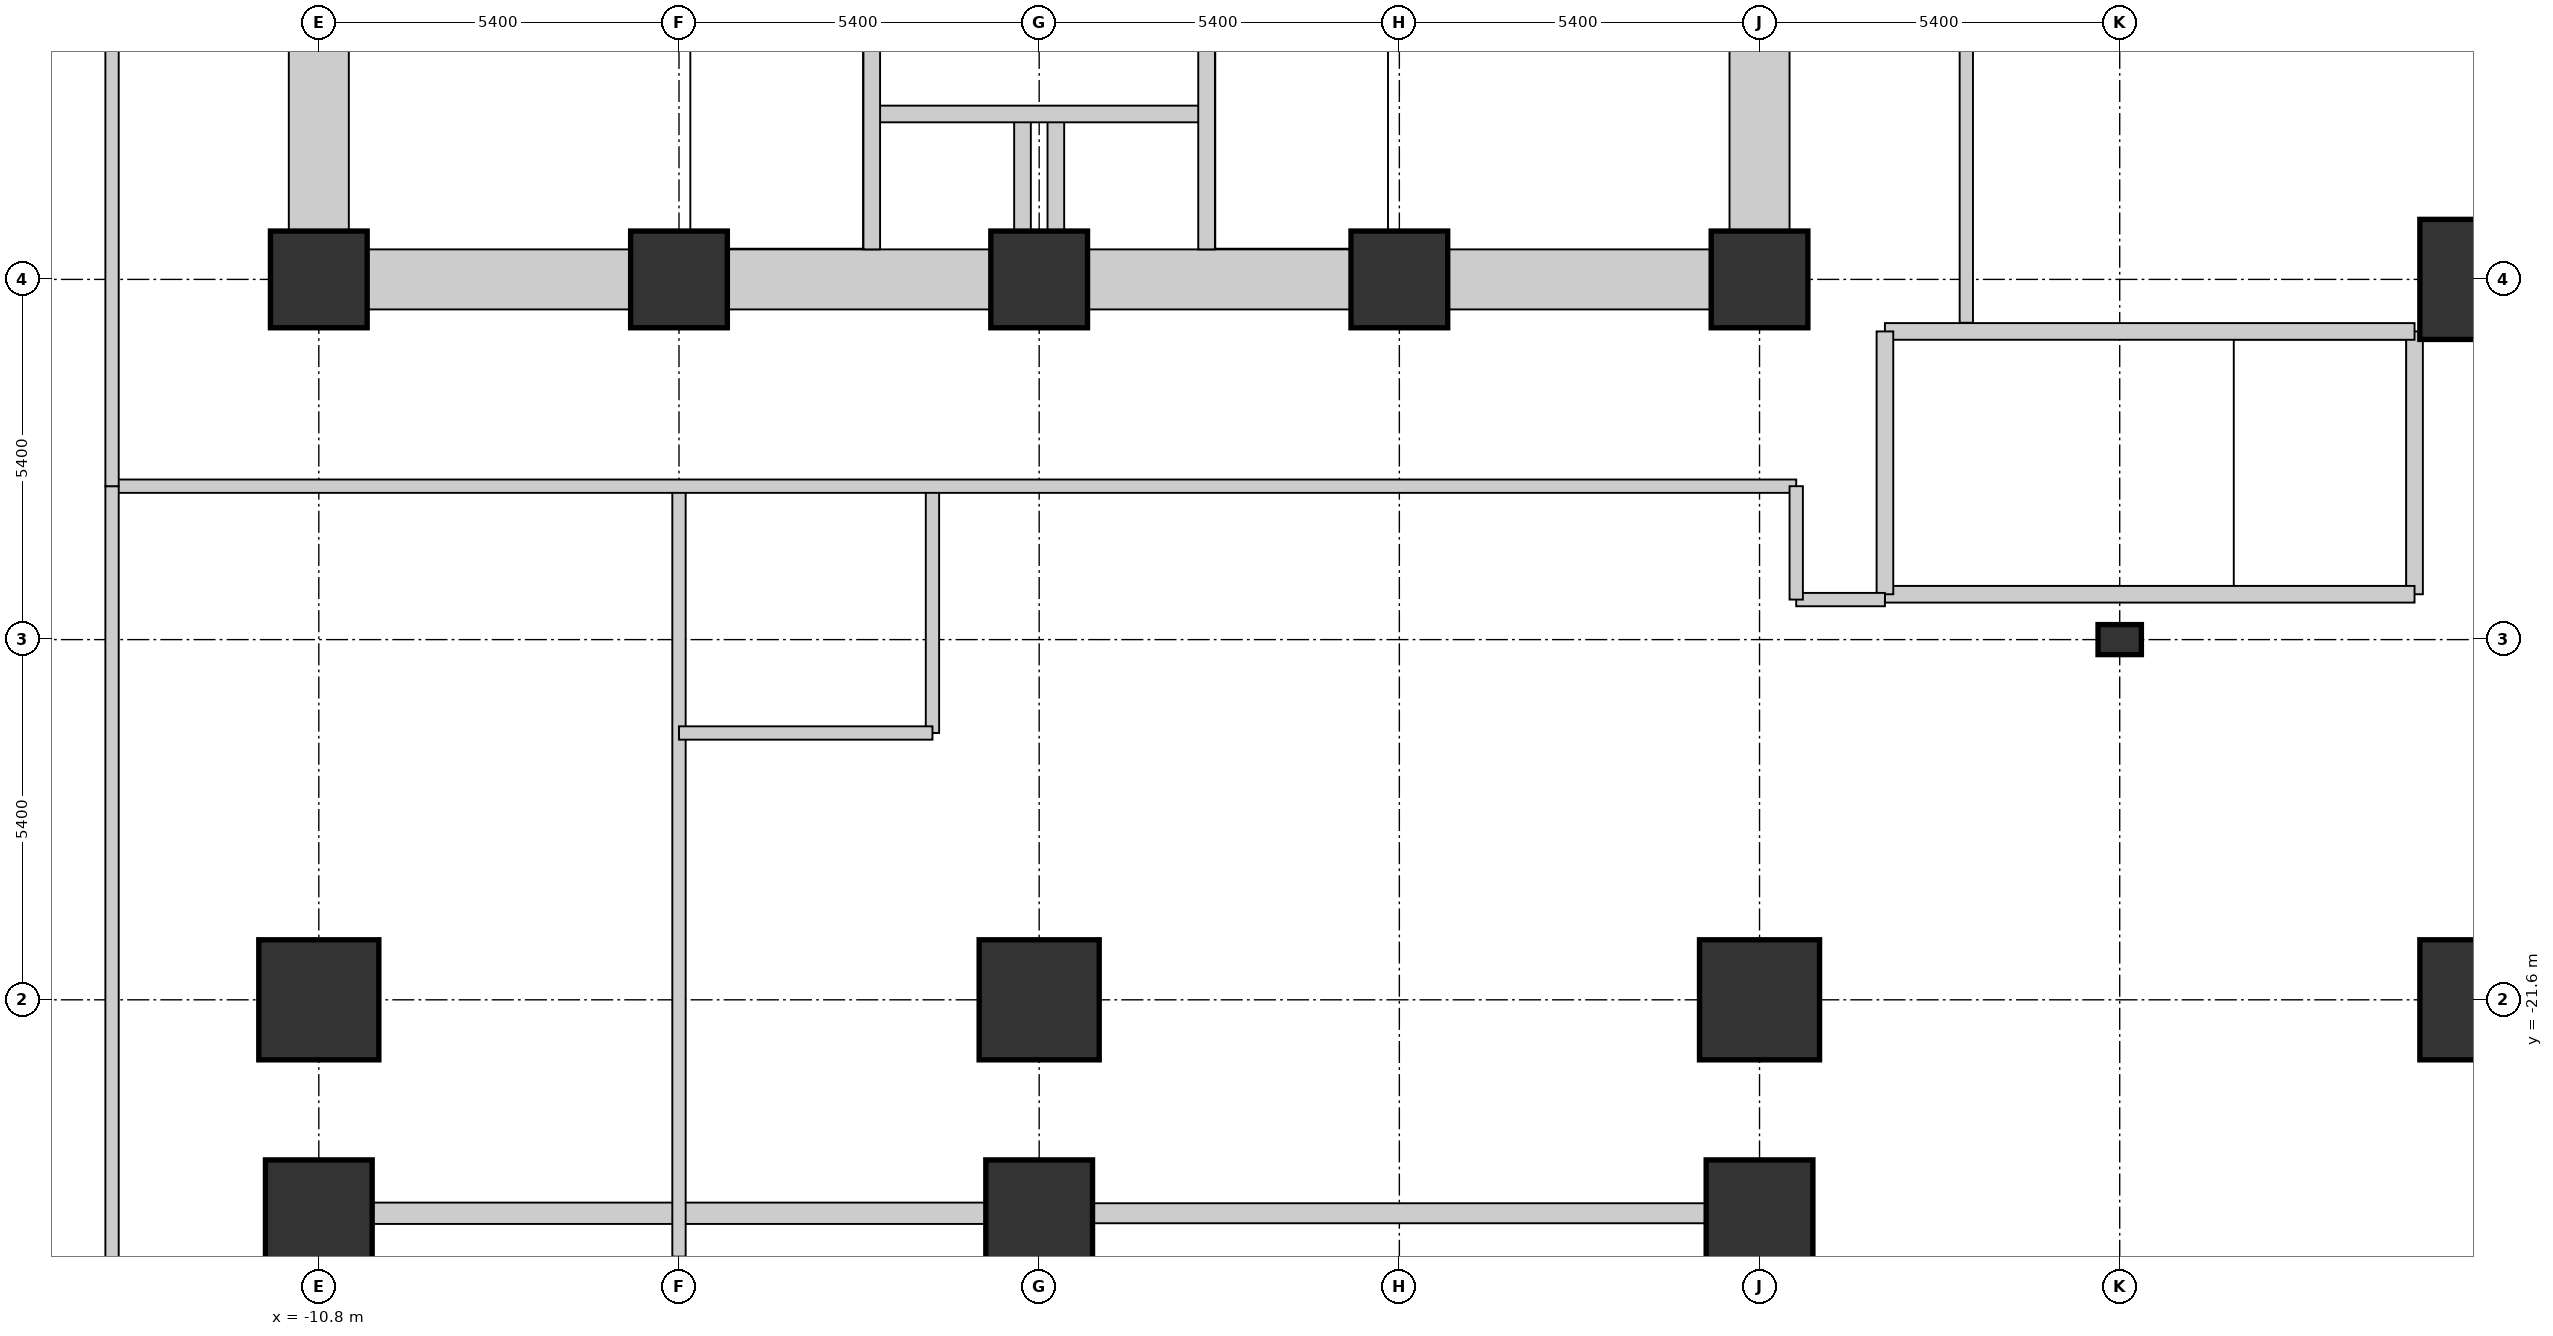
"""IFC4 building model, lengths in metres.
Left out: names, types, materials, properties, quantities, classifications, styles, units other than length and angle.
Written with IfcOpenShell. Run it as: python <this file> out.ifc"""

import sys

from ifc_helpers import new_model, si_unit, direction, frame, frame_2d, origin, origin_2d, place, context, subcontext, project, spatial, rectangle, circle, extrude, element, fill, save


model = new_model("IFC4")
c1 = context("Model", 3, precision=1e-05, world=origin(), true_north=direction((0.0, 1.0)))
c2 = subcontext(c1, "Body", "Model", "MODEL_VIEW")
j1 = project(units=[si_unit("LENGTHUNIT", "METRE"), si_unit("PLANEANGLEUNIT", "RADIAN")], contexts=[c1])
p1 = place(None, origin())
s1 = spatial("IfcSite", under=j1, at=p1, CompositionType="ELEMENT")
p2 = place(p1, origin())
s2 = spatial("IfcBuilding", under=s1, at=p2, CompositionType="ELEMENT")
p3 = place(p2, frame((0.0, 0.0, 9.0)))
s3 = spatial("IfcBuildingStorey", under=s2, at=p3, CompositionType="ELEMENT", Elevation=9.0)
p4 = place(p3, frame((-10.8, -24.8, 0.0), z_axis=(0.0, 0.0, 1.0), x_axis=(1.0, 0.0, 0.0)))
e1 = element("IfcColumn", 1, at=p4, inside=s3, PredefinedType="COLUMN", context=c2, shape_type="SweptSolid", body=[
    extrude(rectangle(XDim=1.6, YDim=1.6, at=origin_2d()), origin(), (0.0, 0.0, 1.0), 4.5),
])
p5 = place(p3, frame((-10.8, -21.6, 0.0), z_axis=(0.0, 0.0, 1.0), x_axis=(1.0, 0.0, 0.0)))
e2 = element("IfcColumn", 2, at=p5, inside=s3, PredefinedType="COLUMN", context=c2, shape_type="SweptSolid", body=[
    extrude(circle(Radius=0.9, at=origin_2d()), origin(), (0.0, 0.0, 1.0), 4.5),
])
for number, where, z_axis, x_axis in (
    (3, (-10.8, -10.8, 0.0), (0.0, 0.0, 1.0), (1.0, 0.0, 0.0)),
    (4, (-5.4, -10.8, 0.0), (0.0, 0.0, 1.0), (1.0, 0.0, 0.0)),
):
    element("IfcColumn", number, at=place(p3, frame(where, z_axis=z_axis, x_axis=x_axis)), inside=s3, PredefinedType="COLUMN", context=c2, shape_type="SweptSolid", body=[
        extrude(rectangle(XDim=1.45, YDim=1.45, at=origin_2d()), origin(), (0.0, 0.0, 1.0), 4.5),
    ])
p6 = place(p3, frame((0.0, -24.8, 0.0), z_axis=(0.0, 0.0, 1.0), x_axis=(1.0, 0.0, 0.0)))
e5 = element("IfcColumn", 5, at=p6, inside=s3, PredefinedType="COLUMN", context=c2, shape_type="SweptSolid", body=[
    extrude(rectangle(XDim=1.6, YDim=1.6, at=origin_2d()), origin(), (0.0, 0.0, 1.0), 4.5),
])
p7 = place(p3, frame((0.0, -21.6, 0.0), z_axis=(0.0, 0.0, 1.0), x_axis=(1.0, 0.0, 0.0)))
e6 = element("IfcColumn", 6, at=p7, inside=s3, PredefinedType="COLUMN", context=c2, shape_type="SweptSolid", body=[
    extrude(circle(Radius=0.9, at=origin_2d()), origin(), (0.0, 0.0, 1.0), 4.5),
])
for number, where, z_axis, x_axis in (
    (7, (0.0, -10.8, 0.0), (0.0, 0.0, 1.0), (1.0, 0.0, 0.0)),
    (8, (5.4, -10.8, 0.0), (0.0, 0.0, 1.0), (1.0, 0.0, 0.0)),
):
    element("IfcColumn", number, at=place(p3, frame(where, z_axis=z_axis, x_axis=x_axis)), inside=s3, PredefinedType="COLUMN", context=c2, shape_type="SweptSolid", body=[
        extrude(rectangle(XDim=1.45, YDim=1.45, at=origin_2d()), origin(), (0.0, 0.0, 1.0), 4.5),
    ])
p8 = place(p3, frame((10.8, -24.8, 0.0), z_axis=(0.0, 0.0, 1.0), x_axis=(1.0, 0.0, 0.0)))
e9 = element("IfcColumn", 9, at=p8, inside=s3, PredefinedType="COLUMN", context=c2, shape_type="SweptSolid", body=[
    extrude(rectangle(XDim=1.6, YDim=1.6, at=origin_2d()), origin(), (0.0, 0.0, 1.0), 4.5),
])
p9 = place(p3, frame((10.8, -21.6, 0.0), z_axis=(0.0, 0.0, 1.0), x_axis=(1.0, 0.0, 0.0)))
e10 = element("IfcColumn", 10, at=p9, inside=s3, PredefinedType="COLUMN", context=c2, shape_type="SweptSolid", body=[
    extrude(circle(Radius=0.9, at=origin_2d()), origin(), (0.0, 0.0, 1.0), 4.5),
])
p10 = place(p3, frame((10.8, -10.8, 0.0), z_axis=(0.0, 0.0, 1.0), x_axis=(1.0, 0.0, 0.0)))
e11 = element("IfcColumn", 11, at=p10, inside=s3, PredefinedType="COLUMN", context=c2, shape_type="SweptSolid", body=[
    extrude(rectangle(XDim=1.45, YDim=1.45, at=origin_2d()), origin(), (0.0, 0.0, 1.0), 4.5),
])
for number, where, z_axis, x_axis in (
    (12, (21.6, -21.6, 0.0), (0.0, 0.0, 1.0), (1.0, 0.0, 0.0)),
    (13, (21.6, -10.8, 0.0), (0.0, 0.0, 1.0), (1.0, 0.0, 0.0)),
):
    element("IfcColumn", number, at=place(p3, frame(where, z_axis=z_axis, x_axis=x_axis)), inside=s3, PredefinedType="COLUMN", context=c2, shape_type="SweptSolid", body=[
        extrude(circle(Radius=0.9, at=origin_2d()), origin(), (0.0, 0.0, 1.0), 4.5),
    ])
p11 = place(p3, frame((16.2, -16.2, 0.0), z_axis=(0.0, 0.0, 1.0), x_axis=(1.0, 0.0, 0.0)))
e14 = element("IfcColumn", 14, at=p11, inside=s3, PredefinedType="PILASTER", context=c2, shape_type="SweptSolid", body=[
    extrude(rectangle(XDim=0.65, YDim=0.45, at=origin_2d()), origin(), (0.0, 0.0, 1.0), 4.5),
])
for number, where, z_axis, x_axis in (
    (15, (-10.065, -10.8, 0.0), (0.0, 0.0, 1.0), (1.0, 0.0, 0.0)),
    (16, (-10.8, -10.065, 0.0), (0.0, 0.0, 1.0), (0.0, 1.0, 0.0)),
    (17, (10.8, -10.065, 0.0), (0.0, 0.0, 1.0), (0.0, 1.0, 0.0)),
    (18, (-4.665, -10.8, 0.0), (0.0, 0.0, 1.0), (1.0, 0.0, 0.0)),
    (19, (0.735, -10.8, 0.0), (0.0, 0.0, 1.0), (1.0, 0.0, 0.0)),
    (20, (6.135, -10.8, 0.0), (0.0, 0.0, 1.0), (1.0, 0.0, 0.0)),
):
    element("IfcWall", number, at=place(p3, frame(where, z_axis=z_axis, x_axis=x_axis)), inside=s3, PredefinedType="SHEAR", context=c2, shape_type="SweptSolid", body=[
        extrude(rectangle(XDim=3.93, YDim=0.9, at=frame_2d((1.965, 0.0))), origin(), (0.0, 0.0, 1.0), 4.5),
    ])
p12 = place(p3, frame((-0.798, -24.8, 0.0), z_axis=(0.0, 0.0, 1.0), x_axis=(-1.0, 0.0, 0.0)))
e21 = element("IfcWall", 21, at=p12, inside=s3, PredefinedType="STANDARD", context=c2, shape_type="SweptSolid", body=[
    extrude(rectangle(XDim=9.204, YDim=0.32, at=frame_2d((4.602, 0.0))), origin(), (0.0, 0.0, 1.0), 3.379),
])
p13 = place(p3, frame((10.002, -24.8, 0.0), z_axis=(0.0, 0.0, 1.0), x_axis=(-1.0, 0.0, 0.0)))
e22 = element("IfcWall", 22, at=p13, inside=s3, PredefinedType="STANDARD", context=c2, shape_type="SweptSolid", body=[
    extrude(rectangle(XDim=9.204, YDim=0.3, at=frame_2d((4.602, 0.0))), origin(), (0.0, 0.0, 1.0), 3.379),
])
p14 = place(p13, frame((3.702, 0.0, 0.85)))
e23 = element("IfcOpeningElement", 23, at=p14, cuts=e22, PredefinedType="OPENING", context=c2, shape_type="SweptSolid", body=[
    extrude(rectangle(XDim=1.8, YDim=1.75, at=frame_2d((0.9, 0.875))), frame((0.0, 0.16, 0.0), z_axis=(0.0, -1.0, 0.0), x_axis=(1.0, 0.0, 0.0)), (0.0, 0.0, 1.0), 0.32),
])
for number, where, z_axis, x_axis in (
    (24, (-0.25, -10.075, 0.0), (0.0, 0.0, 1.0), (0.0, 1.0, 0.0)),
    (25, (0.25, -10.075, 0.0), (0.0, 0.0, 1.0), (0.0, 1.0, 0.0)),
):
    element("IfcWall", number, at=place(p3, frame(where, z_axis=z_axis, x_axis=x_axis)), inside=s3, PredefinedType="SHEAR", context=c2, shape_type="SweptSolid", body=[
        extrude(rectangle(XDim=1.635, YDim=0.25, at=frame_2d((0.817, 0.0))), origin(), (0.0, 0.0, 1.0), 4.5),
    ])
p15 = place(p3, frame((-2.48, -8.32, 0.0), z_axis=(0.0, 0.0, 1.0), x_axis=(1.0, 0.0, 0.0)))
e26 = element("IfcWall", 26, at=p15, inside=s3, PredefinedType="SHEAR", context=c2, shape_type="SweptSolid", body=[
    extrude(rectangle(XDim=4.93, YDim=0.25, at=frame_2d((2.465, 0.0))), origin(), (0.0, 0.0, 1.0), 4.5),
])
for number, where, z_axis, x_axis in (
    (27, (2.51, -10.35, 0.0), (0.0, 0.0, 1.0), (0.0, 1.0, 0.0)),
    (28, (-2.51, -10.35, 0.0), (0.0, 0.0, 1.0), (0.0, 1.0, 0.0)),
):
    element("IfcWall", number, at=place(p3, frame(where, z_axis=z_axis, x_axis=x_axis)), inside=s3, PredefinedType="SHEAR", context=c2, shape_type="SweptSolid", body=[
        extrude(rectangle(XDim=3.84, YDim=0.25, at=frame_2d((1.92, 0.0))), origin(), (0.0, 0.0, 1.0), 4.5),
    ])
p16 = place(p3, frame((20.62, -15.52, 0.0), z_axis=(0.0, 0.0, 1.0), x_axis=(0.0, 1.0, 0.0)))
e29 = element("IfcWall", 29, at=p16, inside=s3, PredefinedType="SHEAR", context=c2, shape_type="SweptSolid", body=[
    extrude(rectangle(XDim=3.94, YDim=0.25, at=frame_2d((1.97, 0.0))), origin(), (0.0, 0.0, 1.0), 4.5),
])
for number, where, z_axis, x_axis in (
    (30, (12.68, -11.58, 0.0), (0.0, 0.0, 1.0), (1.0, 0.0, 0.0)),
    (31, (12.68, -15.52, 0.0), (0.0, 0.0, 1.0), (1.0, 0.0, 0.0)),
):
    element("IfcWall", number, at=place(p3, frame(where, z_axis=z_axis, x_axis=x_axis)), inside=s3, PredefinedType="SHEAR", context=c2, shape_type="SweptSolid", body=[
        extrude(rectangle(XDim=7.94, YDim=0.25, at=frame_2d((3.97, 0.0))), origin(), (0.0, 0.0, 1.0), 4.5),
    ])
p17 = place(p3, frame((12.68, -15.52, 0.0), z_axis=(0.0, 0.0, 1.0), x_axis=(0.0, 1.0, 0.0)))
e32 = element("IfcWall", 32, at=p17, inside=s3, PredefinedType="SHEAR", context=c2, shape_type="SweptSolid", body=[
    extrude(rectangle(XDim=3.94, YDim=0.25, at=frame_2d((1.97, 0.0))), origin(), (0.0, 0.0, 1.0), 4.5),
])
p18 = place(p17, frame((1.42, 0.0, 0.0)))
e33 = element("IfcOpeningElement", 33, at=p18, cuts=e32, PredefinedType="OPENING", context=c2, shape_type="SweptSolid", body=[
    extrude(rectangle(XDim=1.1, YDim=2.1, at=frame_2d((0.55, 1.05))), frame((0.0, 0.135, 0.0), z_axis=(0.0, -1.0, 0.0), x_axis=(1.0, 0.0, 0.0)), (0.0, 0.0, 1.0), 0.27),
])
p19 = place(p3, frame((-5.4, -25.45, 0.0), z_axis=(0.0, 0.0, 1.0), x_axis=(0.0, 1.0, 0.0)))
e34 = element("IfcWall", 34, at=p19, inside=s3, PredefinedType="PARTITIONING", context=c2, shape_type="SweptSolid", body=[
    extrude(rectangle(XDim=11.55, YDim=0.2, at=frame_2d((5.775, 0.0))), origin(), (0.0, 0.0, 1.0), 3.379),
])
p20 = place(p3, frame((-1.6, -17.6, 0.0), z_axis=(0.0, 0.0, 1.0), x_axis=(0.0, 1.0, 0.0)))
e35 = element("IfcWall", 35, at=p20, inside=s3, PredefinedType="PARTITIONING", context=c2, shape_type="SweptSolid", body=[
    extrude(rectangle(XDim=3.7, YDim=0.2, at=frame_2d((1.85, 0.0))), origin(), (0.0, 0.0, 1.0), 4.25),
])
p21 = place(p3, frame((-5.4, -17.6, 0.0), z_axis=(0.0, 0.0, 1.0), x_axis=(1.0, 0.0, 0.0)))
e36 = element("IfcWall", 36, at=p21, inside=s3, PredefinedType="PARTITIONING", context=c2, shape_type="SweptSolid", body=[
    extrude(rectangle(XDim=3.8, YDim=0.2, at=frame_2d((1.9, 0.0))), origin(), (0.0, 0.0, 1.0), 4.25),
])
p22 = place(p3, frame((13.9, -11.45, 0.0), z_axis=(0.0, 0.0, 1.0), x_axis=(0.0, 1.0, 0.0)))
e37 = element("IfcWall", 37, at=p22, inside=s3, PredefinedType="PARTITIONING", context=c2, shape_type="SweptSolid", body=[
    extrude(rectangle(XDim=25.35, YDim=0.2, at=frame_2d((12.675, 0.0))), origin(), (0.0, 0.0, 1.0), 3.379),
])
p23 = place(p22, frame((10.0, 0.0, 0.0)))
e38 = element("IfcOpeningElement", 38, at=p23, cuts=e37, PredefinedType="OPENING", context=c2, shape_type="SweptSolid", body=[
    extrude(rectangle(XDim=1.1, YDim=2.1, at=frame_2d((0.55, 1.05))), frame((0.0, 0.11, 0.0), z_axis=(0.0, -1.0, 0.0), x_axis=(1.0, 0.0, 0.0)), (0.0, 0.0, 1.0), 0.22),
])
p24 = place(p3, frame((-13.9, -13.9, 0.0), z_axis=(0.0, 0.0, 1.0), x_axis=(1.0, 0.0, 0.0)))
e39 = element("IfcWall", 39, at=p24, inside=s3, PredefinedType="PARTITIONING", context=c2, shape_type="SweptSolid", body=[
    extrude(rectangle(XDim=25.25, YDim=0.2, at=frame_2d((12.625, 0.0))), origin(), (0.0, 0.0, 1.0), 3.379),
])
p25 = place(p24, frame((3.5, 0.0, 0.0)))
e40 = element("IfcOpeningElement", 40, at=p25, cuts=e39, PredefinedType="OPENING", context=c2, shape_type="SweptSolid", body=[
    extrude(rectangle(XDim=1.1, YDim=2.1, at=frame_2d((0.55, 1.05))), frame((0.0, 0.11, 0.0), z_axis=(0.0, -1.0, 0.0), x_axis=(1.0, 0.0, 0.0)), (0.0, 0.0, 1.0), 0.22),
])
p26 = place(p24, frame((9.8, 0.0, 0.0)))
e41 = element("IfcOpeningElement", 41, at=p26, cuts=e39, PredefinedType="OPENING", context=c2, shape_type="SweptSolid", body=[
    extrude(rectangle(XDim=0.85, YDim=2.1, at=frame_2d((0.425, 1.05))), frame((0.0, 0.11, 0.0), z_axis=(0.0, -1.0, 0.0), x_axis=(1.0, 0.0, 0.0)), (0.0, 0.0, 1.0), 0.22),
])
p27 = place(p24, frame((16.5, 0.0, 0.0)))
e42 = element("IfcOpeningElement", 42, at=p27, cuts=e39, PredefinedType="OPENING", context=c2, shape_type="SweptSolid", body=[
    extrude(rectangle(XDim=1.1, YDim=2.1, at=frame_2d((0.55, 1.05))), frame((0.0, 0.11, 0.0), z_axis=(0.0, -1.0, 0.0), x_axis=(1.0, 0.0, 0.0)), (0.0, 0.0, 1.0), 0.22),
])
p28 = place(p3, frame((-13.9, -25.86, 0.0), z_axis=(0.0, 0.0, 1.0), x_axis=(0.0, 1.0, 0.0)))
e43 = element("IfcWall", 43, at=p28, inside=s3, PredefinedType="PARTITIONING", context=c2, shape_type="SweptSolid", body=[
    extrude(rectangle(XDim=11.96, YDim=0.2, at=frame_2d((5.98, 0.0))), origin(), (0.0, 0.0, 1.0), 3.379),
])
p29 = place(p3, frame((-13.9, -13.9, 0.0), z_axis=(0.0, 0.0, 1.0), x_axis=(0.0, 1.0, 0.0)))
e44 = element("IfcWall", 44, at=p29, inside=s3, PredefinedType="PARTITIONING", context=c2, shape_type="SweptSolid", body=[
    extrude(rectangle(XDim=27.8, YDim=0.2, at=frame_2d((13.9, 0.0))), origin(), (0.0, 0.0, 1.0), 3.379),
])
p30 = place(p29, frame((12.0, 0.0, 0.0)))
e45 = element("IfcOpeningElement", 45, at=p30, cuts=e44, PredefinedType="OPENING", context=c2, shape_type="SweptSolid", body=[
    extrude(rectangle(XDim=1.1, YDim=2.1, at=frame_2d((0.55, 1.05))), frame((0.0, 0.11, 0.0), z_axis=(0.0, -1.0, 0.0), x_axis=(1.0, 0.0, 0.0)), (0.0, 0.0, 1.0), 0.22),
])
p31 = place(p3, frame((11.35, -15.6, 0.0), z_axis=(0.0, 0.0, 1.0), x_axis=(1.0, 0.0, 0.0)))
e46 = element("IfcWall", 46, at=p31, inside=s3, PredefinedType="PARTITIONING", context=c2, shape_type="SweptSolid", body=[
    extrude(rectangle(XDim=1.33, YDim=0.2, at=frame_2d((0.665, 0.0))), origin(), (0.0, 0.0, 1.0), 4.25),
])
p32 = place(p3, frame((11.35, -15.6, 0.0), z_axis=(0.0, 0.0, 1.0), x_axis=(0.0, 1.0, 0.0)))
e47 = element("IfcWall", 47, at=p32, inside=s3, PredefinedType="PARTITIONING", context=c2, shape_type="SweptSolid", body=[
    extrude(rectangle(XDim=1.7, YDim=0.2, at=frame_2d((0.85, 0.0))), origin(), (0.0, 0.0, 1.0), 4.25),
])
p33 = place(p14, origin())
e48 = element("IfcWindow", 48, at=p33, inside=s3, PartitioningType="SINGLE_PANEL", PredefinedType="WINDOW", context=c2, shape_type="SweptSolid", body=[
    extrude(rectangle(XDim=1.8, YDim=1.75, at=frame_2d((0.9, 0.875))), frame((0.0, 0.03, 0.0), z_axis=(0.0, -1.0, 0.0), x_axis=(1.0, 0.0, 0.0)), (0.0, 0.0, 1.0), 0.06),
])
fill(e23, e48)
p34 = place(p18, origin())
e49 = element("IfcDoor", 49, at=p34, inside=s3, OperationType="SINGLE_SWING_LEFT", PredefinedType="DOOR", context=c2, shape_type="SweptSolid", body=[
    extrude(rectangle(XDim=1.1, YDim=2.1, at=frame_2d((0.55, 1.05))), frame((0.0, 0.025, 0.0), z_axis=(0.0, -1.0, 0.0), x_axis=(1.0, 0.0, 0.0)), (0.0, 0.0, 1.0), 0.05),
])
fill(e33, e49)
p35 = place(p25, origin())
e50 = element("IfcDoor", 50, at=p35, inside=s3, OperationType="SINGLE_SWING_RIGHT", PredefinedType="DOOR", context=c2, shape_type="SweptSolid", body=[
    extrude(rectangle(XDim=1.1, YDim=2.1, at=frame_2d((0.55, 1.05))), frame((0.0, 0.025, 0.0), z_axis=(0.0, -1.0, 0.0), x_axis=(1.0, 0.0, 0.0)), (0.0, 0.0, 1.0), 0.05),
])
fill(e40, e50)
p36 = place(p26, origin())
e51 = element("IfcDoor", 51, at=p36, inside=s3, OperationType="SINGLE_SWING_LEFT", PredefinedType="DOOR", context=c2, shape_type="SweptSolid", body=[
    extrude(rectangle(XDim=0.85, YDim=2.1, at=frame_2d((0.425, 1.05))), frame((0.0, 0.025, 0.0), z_axis=(0.0, -1.0, 0.0), x_axis=(1.0, 0.0, 0.0)), (0.0, 0.0, 1.0), 0.05),
])
fill(e41, e51)
p37 = place(p27, origin())
e52 = element("IfcDoor", 52, at=p37, inside=s3, OperationType="SINGLE_SWING_RIGHT", PredefinedType="DOOR", context=c2, shape_type="SweptSolid", body=[
    extrude(rectangle(XDim=1.1, YDim=2.1, at=frame_2d((0.55, 1.05))), frame((0.0, 0.025, 0.0), z_axis=(0.0, -1.0, 0.0), x_axis=(1.0, 0.0, 0.0)), (0.0, 0.0, 1.0), 0.05),
])
fill(e42, e52)
save(model, sys.argv[1])
